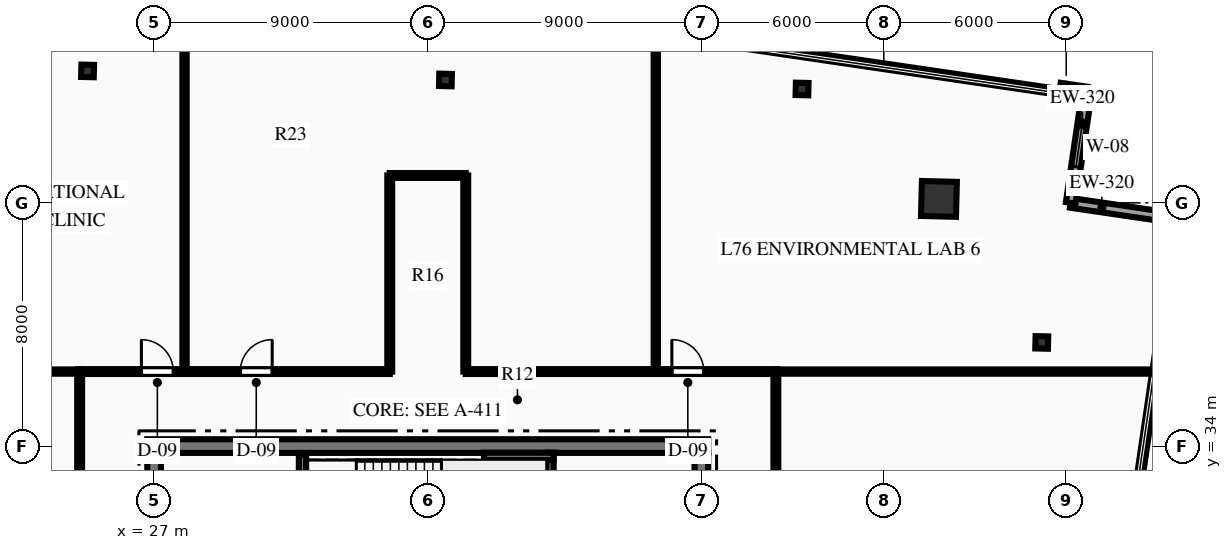
"""IFC4 building model, lengths in metres.
Left out: names, types, materials, properties, quantities, classifications, styles, units other than length and angle.
Written with IfcOpenShell. Run it as: python <this file> out.ifc"""

import sys

from ifc_helpers import new_model, si_unit, direction, frame, frame_2d, origin, origin_2d, place, context, subcontext, project, spatial, rectangle, hollow_rectangle, i_section, extrude, element, fill, save


model = new_model("IFC4")
c1 = context("Model", 3, precision=1e-05, world=origin(), true_north=direction((0.0, 1.0)))
c2 = subcontext(c1, "Body", "Model", "MODEL_VIEW")
j1 = project(units=[si_unit("LENGTHUNIT", "METRE"), si_unit("PLANEANGLEUNIT", "RADIAN")], contexts=[c1])
p1 = place(None, origin())
s1 = spatial("IfcSite", under=j1, at=p1, CompositionType="ELEMENT")
p2 = place(p1, origin())
s2 = spatial("IfcBuilding", under=s1, at=p2, CompositionType="ELEMENT")
p3 = place(p2, frame((0.0, 0.0, 302.7)))
s3 = spatial("IfcBuildingStorey", under=s2, at=p3, CompositionType="ELEMENT", Elevation=302.7)
p4 = place(p3, frame((26.775, 34.0, 0.0), z_axis=(0.0, 0.0, 1.0), x_axis=(1.0, 0.0, 0.0)))
e1 = element("IfcWall", 1, at=p4, inside=s3, PredefinedType="SHEAR", context=c2, shape_type="SweptSolid", body=[
    extrude(rectangle(XDim=18.45, YDim=0.45, at=frame_2d((9.225, 0.0))), origin(), (0.0, 0.0, 1.0), 3.75),
])
p5 = place(p3, frame((27.0, 18.225, 0.0), z_axis=(0.0, 0.0, 1.0), x_axis=(0.0, 1.0, 0.0)))
e2 = element("IfcWall", 2, at=p5, inside=s3, PredefinedType="SHEAR", context=c2, shape_type="SweptSolid", body=[
    extrude(rectangle(XDim=15.55, YDim=0.45, at=frame_2d((7.775, 0.0))), origin(), (0.0, 0.0, 1.0), 3.75),
])
p6 = place(p5, frame((10.015, 0.0, 0.0)))
e3 = element("IfcOpeningElement", 3, at=p6, cuts=e2, PredefinedType="OPENING", context=c2, shape_type="SweptSolid", body=[
    extrude(rectangle(XDim=1.4, YDim=2.2, at=frame_2d((0.7, 1.1))), frame((0.0, 0.235, 0.0), z_axis=(0.0, -1.0, 0.0), x_axis=(1.0, 0.0, 0.0)), (0.0, 0.0, 1.0), 0.47),
])
p7 = place(p3, frame((45.0, 18.225, 0.0), z_axis=(0.0, 0.0, 1.0), x_axis=(0.0, 1.0, 0.0)))
e4 = element("IfcWall", 4, at=p7, inside=s3, PredefinedType="SHEAR", context=c2, shape_type="SweptSolid", body=[
    extrude(rectangle(XDim=15.55, YDim=0.45, at=frame_2d((7.775, 0.0))), origin(), (0.0, 0.0, 1.0), 3.75),
])
p8 = place(p7, frame((10.015, 0.0, 0.0)))
e5 = element("IfcOpeningElement", 5, at=p8, cuts=e4, PredefinedType="OPENING", context=c2, shape_type="SweptSolid", body=[
    extrude(rectangle(XDim=1.4, YDim=2.2, at=frame_2d((0.7, 1.1))), frame((0.0, 0.235, 0.0), z_axis=(0.0, -1.0, 0.0), x_axis=(1.0, 0.0, 0.0)), (0.0, 0.0, 1.0), 0.47),
])
p9 = place(p3, frame((31.88, 29.93, 0.0), z_axis=(0.0, 0.0, 1.0), x_axis=(0.0, 1.0, 0.0)))
e6 = element("IfcWall", 6, at=p9, inside=s3, PredefinedType="SHEAR", context=c2, shape_type="SweptSolid", body=[
    extrude(rectangle(XDim=3.79, YDim=0.24, at=frame_2d((1.895, 0.0))), origin(), (0.0, 0.0, 1.0), 3.75),
])
p10 = place(p3, frame((40.02, 29.93, 0.0), z_axis=(0.0, 0.0, 1.0), x_axis=(0.0, 1.0, 0.0)))
e7 = element("IfcWall", 7, at=p10, inside=s3, PredefinedType="SHEAR", context=c2, shape_type="SweptSolid", body=[
    extrude(rectangle(XDim=3.85, YDim=0.24, at=frame_2d((1.925, 0.0))), origin(), (0.0, 0.0, 1.0), 3.75),
])
p11 = place(p3, frame((37.85, 33.66, 0.0), z_axis=(0.0, 0.0, 1.0), x_axis=(1.0, 0.0, 0.0)))
e8 = element("IfcWall", 8, at=p11, inside=s3, PredefinedType="SHEAR", context=c2, shape_type="SweptSolid", body=[
    extrude(rectangle(XDim=2.29, YDim=0.24, at=frame_2d((1.145, 0.0))), origin(), (0.0, 0.0, 1.0), 3.75),
])
p12 = place(p3, frame((52.813, 42.13, 0.0), z_axis=(0.0, 0.0, 1.0), x_axis=(0.025304572866, 0.999679788028, 0.0)))
e9 = element("IfcColumn", 9, at=p12, inside=s3, PredefinedType="COLUMN", context=c2, shape_type="SweptSolid", body=[
    extrude(hollow_rectangle(XDim=1.15, YDim=1.15, WallThickness=0.05, at=origin_2d()), origin(), (0.0, 0.0, 1.0), 3.75),
])
for number, where, z_axis, x_axis in (
    (10, (56.195, 37.409, 0.0), (0.0, 0.0, 1.0), (0.025, 1.0, 0.0)),
    (11, (48.312, 45.745, 0.0), (0.0, 0.0, 1.0), (0.025, 1.0, 0.0)),
    (12, (36.582, 46.042, 0.0), (0.0, 0.0, 1.0), (0.025, 1.0, 0.0)),
    (13, (24.811, 46.34, 0.0), (0.0, 0.0, 1.0), (0.025, 1.0, 0.0)),
):
    element("IfcColumn", number, at=place(p3, frame(where, z_axis=z_axis, x_axis=x_axis)), inside=s3, PredefinedType="COLUMN", context=c2, shape_type="SweptSolid", body=[
        extrude(i_section(OverallWidth=0.406, OverallDepth=0.416, WebThickness=0.03, FlangeThickness=0.048, at=origin_2d()), origin(), (0.0, 0.0, 1.0), 3.75),
    ])
p13 = place(p3, frame((57.147, 41.999, 0.0), z_axis=(0.0, 0.0, 1.0), x_axis=(0.989398487116, -0.145226146725, 0.0)))
e14 = element("IfcWall", 14, at=p13, inside=s3, PredefinedType="STANDARD", context=c2, shape_type="SweptSolid", body=[
    extrude(rectangle(XDim=3.7, YDim=0.32, at=frame_2d((1.85, 0.0))), origin(), (0.0, 0.0, 1.0), 3.49),
])
p14 = place(p3, frame((57.685, 45.659, 0.0), z_axis=(0.0, 0.0, 1.0), x_axis=(-0.145235628047, -0.98939709538, 0.0)))
e15 = element("IfcWall", 15, at=p14, inside=s3, PredefinedType="STANDARD", context=c2, shape_type="SweptSolid", body=[
    extrude(rectangle(XDim=3.7, YDim=0.32, at=frame_2d((1.85, 0.0))), origin(), (0.0, 0.0, 1.0), 3.49),
])
p15 = place(p14, frame((1.2, 0.0, 0.85)))
e16 = element("IfcOpeningElement", 16, at=p15, cuts=e15, PredefinedType="OPENING", context=c2, shape_type="SweptSolid", body=[
    extrude(rectangle(XDim=1.3, YDim=1.9, at=frame_2d((0.65, 0.95))), frame((0.0, 0.17, 0.0), z_axis=(0.0, -1.0, 0.0), x_axis=(1.0, 0.0, 0.0)), (0.0, 0.0, 1.0), 0.34),
])
p16 = place(p3, frame((56.794, 45.79, 0.0), z_axis=(0.0, 0.0, 1.0), x_axis=(0.989377499091, -0.145369062366, 0.0)))
e17 = element("IfcWall", 17, at=p16, inside=s3, PredefinedType="STANDARD", context=c2, shape_type="SweptSolid", body=[
    extrude(rectangle(XDim=0.9, YDim=0.32, at=frame_2d((0.45, 0.0))), origin(), (0.0, 0.0, 1.0), 3.49),
])
p17 = place(p3, frame((24.5, 36.45, 0.0), z_axis=(0.0, 0.0, 1.0), x_axis=(1.0, 0.0, 0.0)))
e18 = element("IfcWall", 18, at=p17, inside=s3, PredefinedType="PARTITIONING", context=c2, shape_type="SweptSolid", body=[
    extrude(rectangle(XDim=10.25, YDim=0.16, at=frame_2d((5.125, 0.0))), origin(), (0.0, 0.0, 1.0), 3.49),
])
p18 = place(p17, frame((2.081, 0.0, 0.0)))
e19 = element("IfcOpeningElement", 19, at=p18, cuts=e18, PredefinedType="OPENING", context=c2, shape_type="SweptSolid", body=[
    extrude(rectangle(XDim=1.05, YDim=2.15, at=frame_2d((0.525, 1.075))), frame((0.0, 0.09, 0.0), z_axis=(0.0, -1.0, 0.0), x_axis=(1.0, 0.0, 0.0)), (0.0, 0.0, 1.0), 0.18),
])
p19 = place(p17, frame((5.334, 0.0, 0.0)))
e20 = element("IfcOpeningElement", 20, at=p19, cuts=e18, PredefinedType="OPENING", context=c2, shape_type="SweptSolid", body=[
    extrude(rectangle(XDim=1.05, YDim=2.15, at=frame_2d((0.525, 1.075))), frame((0.0, 0.09, 0.0), z_axis=(0.0, -1.0, 0.0), x_axis=(1.0, 0.0, 0.0)), (0.0, 0.0, 1.0), 0.18),
])
p20 = place(p3, frame((37.25, 36.45, 0.0), z_axis=(0.0, 0.0, 1.0), x_axis=(1.0, 0.0, 0.0)))
e21 = element("IfcWall", 21, at=p20, inside=s3, PredefinedType="PARTITIONING", context=c2, shape_type="SweptSolid", body=[
    extrude(rectangle(XDim=10.25, YDim=0.16, at=frame_2d((5.125, 0.0))), origin(), (0.0, 0.0, 1.0), 3.49),
])
p21 = place(p20, frame((6.779, 0.0, 0.0)))
e22 = element("IfcOpeningElement", 22, at=p21, cuts=e21, PredefinedType="OPENING", context=c2, shape_type="SweptSolid", body=[
    extrude(rectangle(XDim=1.05, YDim=2.15, at=frame_2d((0.525, 1.075))), frame((0.0, 0.09, 0.0), z_axis=(0.0, -1.0, 0.0), x_axis=(1.0, 0.0, 0.0)), (0.0, 0.0, 1.0), 0.18),
])
p22 = place(p3, frame((24.55, 27.25, 0.0), z_axis=(0.0, 0.0, 1.0), x_axis=(0.0, 1.0, 0.0)))
e23 = element("IfcWall", 23, at=p22, inside=s3, PredefinedType="PARTITIONING", context=c2, shape_type="SweptSolid", body=[
    extrude(rectangle(XDim=9.2, YDim=0.16, at=frame_2d((4.6, 0.0))), origin(), (0.0, 0.0, 1.0), 3.49),
])
p23 = place(p22, frame((4.346, 0.0, 0.0)))
e24 = element("IfcOpeningElement", 24, at=p23, cuts=e23, PredefinedType="OPENING", context=c2, shape_type="SweptSolid", body=[
    extrude(rectangle(XDim=1.05, YDim=2.15, at=frame_2d((0.525, 1.075))), frame((0.0, 0.09, 0.0), z_axis=(0.0, -1.0, 0.0), x_axis=(1.0, 0.0, 0.0)), (0.0, 0.0, 1.0), 0.18),
])
p24 = place(p3, frame((47.45, 27.25, 0.0), z_axis=(0.0, 0.0, 1.0), x_axis=(0.0, 1.0, 0.0)))
e25 = element("IfcWall", 25, at=p24, inside=s3, PredefinedType="PARTITIONING", context=c2, shape_type="SweptSolid", body=[
    extrude(rectangle(XDim=9.2, YDim=0.16, at=frame_2d((4.6, 0.0))), origin(), (0.0, 0.0, 1.0), 3.49),
])
p25 = place(p24, frame((4.075, 0.0, 0.0)))
e26 = element("IfcOpeningElement", 26, at=p25, cuts=e25, PredefinedType="OPENING", context=c2, shape_type="SweptSolid", body=[
    extrude(rectangle(XDim=1.05, YDim=2.15, at=frame_2d((0.525, 1.075))), frame((0.0, 0.09, 0.0), z_axis=(0.0, -1.0, 0.0), x_axis=(1.0, 0.0, 0.0)), (0.0, 0.0, 1.0), 0.18),
])
for number, where, z_axis, x_axis in (
    (27, (34.75, 36.45, 0.0), (0.0, 0.0, 1.0), (0.0, 1.0, 0.0)),
    (28, (37.25, 36.45, 0.0), (0.0, 0.0, 1.0), (0.0, 1.0, 0.0)),
):
    element("IfcWall", number, at=place(p3, frame(where, z_axis=z_axis, x_axis=x_axis)), inside=s3, PredefinedType="PARTITIONING", context=c2, shape_type="SweptSolid", body=[
        extrude(rectangle(XDim=6.45, YDim=0.16, at=frame_2d((3.225, 0.0))), origin(), (0.0, 0.0, 1.0), 3.49),
    ])
p26 = place(p3, frame((34.75, 42.9, 0.0), z_axis=(0.0, 0.0, 1.0), x_axis=(1.0, 0.0, 0.0)))
e29 = element("IfcWall", 29, at=p26, inside=s3, PredefinedType="PARTITIONING", context=c2, shape_type="SweptSolid", body=[
    extrude(rectangle(XDim=2.5, YDim=0.16, at=frame_2d((1.25, 0.0))), origin(), (0.0, 0.0, 1.0), 3.49),
])
p27 = place(p3, frame((15.035, 36.45, 0.0), z_axis=(0.0, 0.0, 1.0), x_axis=(1.0, 0.0, 0.0)))
e30 = element("IfcWall", 30, at=p27, inside=s3, PredefinedType="PARTITIONING", context=c2, shape_type="SweptSolid", body=[
    extrude(rectangle(XDim=9.515, YDim=0.14, at=frame_2d((4.757, 0.0))), origin(), (0.0, 0.0, 1.0), 2.868),
])
p28 = place(p3, frame((47.45, 36.45, 0.0), z_axis=(0.0, 0.0, 1.0), x_axis=(1.0, 0.0, 0.0)))
e31 = element("IfcWall", 31, at=p28, inside=s3, PredefinedType="PARTITIONING", context=c2, shape_type="SweptSolid", body=[
    extrude(rectangle(XDim=12.582, YDim=0.14, at=frame_2d((6.291, 0.0))), origin(), (0.0, 0.0, 1.0), 3.079),
])
p29 = place(p3, frame((28.0, 36.45, 0.0), z_axis=(0.0, 0.0, 1.0), x_axis=(0.0, 1.0, 0.0)))
e32 = element("IfcWall", 32, at=p29, inside=s3, PredefinedType="PARTITIONING", context=c2, shape_type="SweptSolid", body=[
    extrude(rectangle(XDim=13.526, YDim=0.14, at=frame_2d((6.763, 0.0))), origin(), (0.0, 0.0, 1.0), 3.49),
])
p30 = place(p3, frame((43.5, 36.45, 0.0), z_axis=(0.0, 0.0, 1.0), x_axis=(0.0, 1.0, 0.0)))
e33 = element("IfcWall", 33, at=p30, inside=s3, PredefinedType="PARTITIONING", context=c2, shape_type="SweptSolid", body=[
    extrude(rectangle(XDim=11.251, YDim=0.14, at=frame_2d((5.625, 0.0))), origin(), (0.0, 0.0, 1.0), 3.49),
])
p31 = place(p15, origin())
e34 = element("IfcWindow", 34, at=p31, inside=s3, PartitioningType="SINGLE_PANEL", PredefinedType="WINDOW", context=c2, shape_type="SweptSolid", body=[
    extrude(rectangle(XDim=1.3, YDim=1.9, at=frame_2d((0.65, 0.95))), frame((0.0, 0.03, 0.0), z_axis=(0.0, -1.0, 0.0), x_axis=(1.0, 0.0, 0.0)), (0.0, 0.0, 1.0), 0.06),
])
fill(e16, e34)
p32 = place(p18, origin())
e35 = element("IfcDoor", 35, at=p32, inside=s3, OperationType="SINGLE_SWING_LEFT", PredefinedType="DOOR", context=c2, shape_type="SweptSolid", body=[
    extrude(rectangle(XDim=1.05, YDim=2.15, at=frame_2d((0.525, 1.075))), frame((0.0, 0.025, 0.0), z_axis=(0.0, -1.0, 0.0), x_axis=(1.0, 0.0, 0.0)), (0.0, 0.0, 1.0), 0.05),
])
fill(e19, e35)
p33 = place(p19, origin())
e36 = element("IfcDoor", 36, at=p33, inside=s3, OperationType="SINGLE_SWING_RIGHT", PredefinedType="DOOR", context=c2, shape_type="SweptSolid", body=[
    extrude(rectangle(XDim=1.05, YDim=2.15, at=frame_2d((0.525, 1.075))), frame((0.0, 0.025, 0.0), z_axis=(0.0, -1.0, 0.0), x_axis=(1.0, 0.0, 0.0)), (0.0, 0.0, 1.0), 0.05),
])
fill(e20, e36)
p34 = place(p21, origin())
e37 = element("IfcDoor", 37, at=p34, inside=s3, OperationType="SINGLE_SWING_LEFT", PredefinedType="DOOR", context=c2, shape_type="SweptSolid", body=[
    extrude(rectangle(XDim=1.05, YDim=2.15, at=frame_2d((0.525, 1.075))), frame((0.0, 0.025, 0.0), z_axis=(0.0, -1.0, 0.0), x_axis=(1.0, 0.0, 0.0)), (0.0, 0.0, 1.0), 0.05),
])
fill(e22, e37)
save(model, sys.argv[1])
